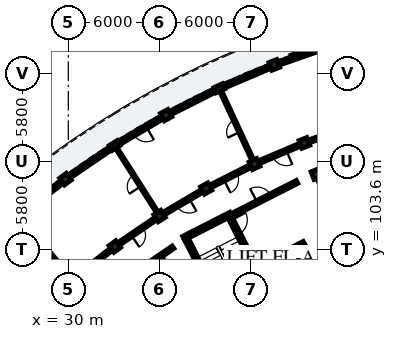
"""IFC4 building model, lengths in metres.
Left out: names, types, materials, properties, quantities, classifications, styles, units other than length and angle.
Written with IfcOpenShell. Run it as: python <this file> out.ifc"""

import sys

from ifc_helpers import new_model, si_unit, direction, frame, frame_2d, origin, origin_2d, place, context, subcontext, project, spatial, rectangle, extrude, element, fill, save


model = new_model("IFC4")
c1 = context("Model", 3, precision=1e-05, world=origin(), true_north=direction((0.0, 1.0)))
c2 = subcontext(c1, "Body", "Model", "MODEL_VIEW")
j1 = project(units=[si_unit("LENGTHUNIT", "METRE"), si_unit("PLANEANGLEUNIT", "RADIAN")], contexts=[c1])
p1 = place(None, origin())
s1 = spatial("IfcSite", under=j1, at=p1, CompositionType="ELEMENT")
p2 = place(p1, origin())
s2 = spatial("IfcBuilding", under=s1, at=p2, CompositionType="ELEMENT")
p3 = place(p2, frame((0.0, 0.0, 15.56)))
s3 = spatial("IfcBuildingStorey", under=s2, at=p3, CompositionType="ELEMENT", Elevation=15.56)
p4 = place(p3, frame((37.773, 104.296, 0.0), z_axis=(0.0, 0.0, 1.0), x_axis=(0.453992276384, -0.891005618941, 0.0)))
e1 = element("IfcWall", 1, at=p4, inside=s3, PredefinedType="SHEAR", context=c2, shape_type="SweptSolid", body=[
    extrude(rectangle(XDim=6.6, YDim=0.28, at=frame_2d((3.3, 0.0))), origin(), (0.0, 0.0, 1.0), 3.11),
])
p5 = place(p3, frame((37.585, 104.357, 0.0), z_axis=(0.0, 0.0, 1.0), x_axis=(0.891020222667, 0.453963613958, 0.0)))
e2 = element("IfcWall", 2, at=p5, inside=s3, PredefinedType="SHEAR", context=c2, shape_type="SweptSolid", body=[
    extrude(rectangle(XDim=3.48, YDim=0.28, at=frame_2d((1.74, 0.0))), origin(), (0.0, 0.0, 1.0), 3.11),
])
p6 = place(p3, frame((40.625, 105.748, 0.0), z_axis=(0.0, 0.0, 1.0), x_axis=(0.453992276384, -0.891005618941, 0.0)))
e3 = element("IfcWall", 3, at=p6, inside=s3, PredefinedType="SHEAR", context=c2, shape_type="SweptSolid", body=[
    extrude(rectangle(XDim=6.6, YDim=0.28, at=frame_2d((3.3, 0.0))), origin(), (0.0, 0.0, 1.0), 3.11),
])
p7 = place(p6, frame((0.22, 0.0, 0.0)))
e4 = element("IfcOpeningElement", 4, at=p7, cuts=e3, PredefinedType="OPENING", context=c2, shape_type="SweptSolid", body=[
    extrude(rectangle(XDim=1.05, YDim=2.15, at=frame_2d((0.525, 1.075))), frame((0.0, 0.15, 0.0), z_axis=(0.0, -1.0, 0.0), x_axis=(1.0, 0.0, 0.0)), (0.0, 0.0, 1.0), 0.3),
])
p8 = place(p3, frame((42.597, 102.561, 0.0), z_axis=(0.0, 0.0, 1.0), x_axis=(0.891001200497, 0.454000947921, 0.0)))
e5 = element("IfcWall", 5, at=p8, inside=s3, PredefinedType="SHEAR", context=c2, shape_type="SweptSolid", body=[
    extrude(rectangle(XDim=3.26, YDim=0.23, at=frame_2d((1.63, 0.0))), origin(), (0.0, 0.0, 1.0), 3.11),
])
p9 = place(p8, frame((0.9, 0.0, 0.0)))
e6 = element("IfcOpeningElement", 6, at=p9, cuts=e5, PredefinedType="OPENING", context=c2, shape_type="SweptSolid", body=[
    extrude(rectangle(XDim=1.1, YDim=2.15, at=frame_2d((0.55, 1.075))), frame((0.0, 0.125, 0.0), z_axis=(0.0, -1.0, 0.0), x_axis=(1.0, 0.0, 0.0)), (0.0, 0.0, 1.0), 0.25),
])
p10 = place(p3, frame((45.451, 103.886, 0.0), z_axis=(0.0, 0.0, 1.0), x_axis=(0.454000278178, -0.891001541758, 0.0)))
e7 = element("IfcWall", 7, at=p10, inside=s3, PredefinedType="SHEAR", context=c2, shape_type="SweptSolid", body=[
    extrude(rectangle(XDim=2.7, YDim=0.23, at=frame_2d((1.35, 0.0))), origin(), (0.0, 0.0, 1.0), 3.11),
])
for number, where, z_axis, x_axis in (
    (8, (46.325, 108.57, 0.0), (0.0, 0.0, 1.0), (-0.36, 0.933, 0.0)),
    (9, (45.532, 110.622, 0.0), (0.0, 0.0, 1.0), (-0.36, 0.933, 0.0)),
    (10, (43.552, 115.753, 0.0), (0.0, 0.0, 1.0), (-0.36, 0.933, 0.0)),
    (11, (42.252, 109.23, 0.0), (0.0, 0.0, 1.0), (-0.421, 0.907, 0.0)),
):
    element("IfcColumn", number, at=place(p3, frame(where, z_axis=z_axis, x_axis=x_axis)), inside=s3, PredefinedType="COLUMN", context=c2, shape_type="SweptSolid", body=[
        extrude(rectangle(XDim=0.55, YDim=0.55, at=origin_2d()), origin(), (0.0, 0.0, 1.0), 3.11),
    ])
p11 = place(p3, frame((39.938, 114.219, 0.0), z_axis=(0.0, 0.0, 1.0), x_axis=(-0.420859924104, 0.907125638643, 0.0)))
e12 = element("IfcColumn", 12, at=p11, inside=s3, PredefinedType="PILASTER", context=c2, shape_type="SweptSolid", body=[
    extrude(rectangle(XDim=0.38, YDim=0.62, at=origin_2d()), origin(), (0.0, 0.0, 1.0), 3.11),
])
for number, where, z_axis, x_axis in (
    (13, (39.072, 107.625, 0.0), (0.0, 0.0, 1.0), (-0.48, 0.877, 0.0)),
    (14, (36.433, 112.451, 0.0), (0.0, 0.0, 1.0), (-0.48, 0.877, 0.0)),
    (15, (36.003, 105.813, 0.0), (0.0, 0.0, 1.0), (-0.536, 0.844, 0.0)),
):
    element("IfcColumn", number, at=place(p3, frame(where, z_axis=z_axis, x_axis=x_axis)), inside=s3, PredefinedType="COLUMN", context=c2, shape_type="SweptSolid", body=[
        extrude(rectangle(XDim=0.55, YDim=0.55, at=origin_2d()), origin(), (0.0, 0.0, 1.0), 3.11),
    ])
p12 = place(p3, frame((33.052, 110.455, 0.0), z_axis=(0.0, 0.0, 1.0), x_axis=(-0.536481603385, 0.843912015099, 0.0)))
e16 = element("IfcColumn", 16, at=p12, inside=s3, PredefinedType="PILASTER", context=c2, shape_type="SweptSolid", body=[
    extrude(rectangle(XDim=0.38, YDim=0.62, at=origin_2d()), origin(), (0.0, 0.0, 1.0), 3.11),
])
for number, where, z_axis, x_axis in (
    (17, (33.061, 103.804, 0.0), (0.0, 0.0, 1.0), (-0.591, 0.807, 0.0)),
    (18, (29.811, 108.241, 0.0), (0.0, 0.0, 1.0), (-0.591, 0.807, 0.0)),
):
    element("IfcColumn", number, at=place(p3, frame(where, z_axis=z_axis, x_axis=x_axis)), inside=s3, PredefinedType="COLUMN", context=c2, shape_type="SweptSolid", body=[
        extrude(rectangle(XDim=0.55, YDim=0.55, at=origin_2d()), origin(), (0.0, 0.0, 1.0), 3.11),
    ])
p13 = place(p3, frame((47.107, 116.993, 0.0), z_axis=(0.0, 0.0, 1.0), x_axis=(-0.944267366677, -0.329179495455, 0.0)))
e19 = element("IfcWall", 19, at=p13, inside=s3, PredefinedType="SOLIDWALL", context=c2, shape_type="SweptSolid", body=[
    extrude(rectangle(XDim=3.521, YDim=0.245, at=frame_2d((1.76, 0.0))), origin(), (0.0, 0.0, 1.0), 2.355),
])
p14 = place(p13, frame((0.86, 0.0, 0.35)))
e20 = element("IfcOpeningElement", 20, at=p14, cuts=e19, PredefinedType="OPENING", context=c2, shape_type="SweptSolid", body=[
    extrude(rectangle(XDim=1.8, YDim=1.85, at=frame_2d((0.9, 0.925))), frame((0.0, 0.133, 0.0), z_axis=(0.0, -1.0, 0.0), x_axis=(1.0, 0.0, 0.0)), (0.0, 0.0, 1.0), 0.265),
])
p15 = place(p3, frame((43.326, 115.657, 0.0), z_axis=(0.0, 0.0, 1.0), x_axis=(-0.920502438884, -0.390736816807, 0.0)))
e21 = element("IfcWall", 21, at=p15, inside=s3, PredefinedType="SOLIDWALL", context=c2, shape_type="SweptSolid", body=[
    extrude(rectangle(XDim=3.521, YDim=0.245, at=frame_2d((1.76, 0.0))), origin(), (0.0, 0.0, 1.0), 2.355),
])
p16 = place(p15, frame((1.12, 0.0, 0.55)))
e22 = element("IfcOpeningElement", 22, at=p16, cuts=e21, PredefinedType="OPENING", context=c2, shape_type="SweptSolid", body=[
    extrude(rectangle(XDim=1.28, YDim=1.52, at=frame_2d((0.64, 0.76))), frame((0.0, 0.133, 0.0), z_axis=(0.0, -1.0, 0.0), x_axis=(1.0, 0.0, 0.0)), (0.0, 0.0, 1.0), 0.265),
])
p17 = place(p3, frame((39.795, 114.147, 0.0), z_axis=(0.0, 0.0, 1.0), x_axis=(-0.892756700232, -0.450539092855, 0.0)))
e23 = element("IfcWall", 23, at=p17, inside=s3, PredefinedType="SOLIDWALL", context=c2, shape_type="SweptSolid", body=[
    extrude(rectangle(XDim=3.521, YDim=0.245, at=frame_2d((1.76, 0.0))), origin(), (0.0, 0.0, 1.0), 2.355),
])
p18 = place(p17, frame((0.97, 0.0, 0.35)))
e24 = element("IfcOpeningElement", 24, at=p18, cuts=e23, PredefinedType="OPENING", context=c2, shape_type="SweptSolid", body=[
    extrude(rectangle(XDim=1.58, YDim=1.68, at=frame_2d((0.79, 0.84))), frame((0.0, 0.133, 0.0), z_axis=(0.0, -1.0, 0.0), x_axis=(1.0, 0.0, 0.0)), (0.0, 0.0, 1.0), 0.265),
])
p19 = place(p3, frame((36.222, 112.326, 0.0), z_axis=(0.0, 0.0, 1.0), x_axis=(-0.861154218161, -0.50834379365, 0.0)))
e25 = element("IfcWall", 25, at=p19, inside=s3, PredefinedType="SOLIDWALL", context=c2, shape_type="SweptSolid", body=[
    extrude(rectangle(XDim=3.521, YDim=0.245, at=frame_2d((1.76, 0.0))), origin(), (0.0, 0.0, 1.0), 2.355),
])
p20 = place(p19, frame((1.27, 0.0, 0.0)))
e26 = element("IfcOpeningElement", 26, at=p20, cuts=e25, PredefinedType="OPENING", context=c2, shape_type="SweptSolid", body=[
    extrude(rectangle(XDim=0.98, YDim=2.12, at=frame_2d((0.49, 1.06))), frame((0.0, 0.133, 0.0), z_axis=(0.0, -1.0, 0.0), x_axis=(1.0, 0.0, 0.0)), (0.0, 0.0, 1.0), 0.265),
])
p21 = place(p3, frame((32.92, 110.365, 0.0), z_axis=(0.0, 0.0, 1.0), x_axis=(-0.825745840472, -0.56404238045, 0.0)))
e27 = element("IfcWall", 27, at=p21, inside=s3, PredefinedType="SOLIDWALL", context=c2, shape_type="SweptSolid", body=[
    extrude(rectangle(XDim=3.521, YDim=0.245, at=frame_2d((1.76, 0.0))), origin(), (0.0, 0.0, 1.0), 2.355),
])
p22 = place(p21, frame((1.08, 0.0, 0.55)))
e28 = element("IfcOpeningElement", 28, at=p22, cuts=e27, PredefinedType="OPENING", context=c2, shape_type="SweptSolid", body=[
    extrude(rectangle(XDim=1.36, YDim=1.61, at=frame_2d((0.68, 0.805))), frame((0.0, 0.133, 0.0), z_axis=(0.0, -1.0, 0.0), x_axis=(1.0, 0.0, 0.0)), (0.0, 0.0, 1.0), 0.265),
])
p23 = place(p3, frame((29.618, 108.09, 0.0), z_axis=(0.0, 0.0, 1.0), x_axis=(-0.786813798172, -0.617190446301, 0.0)))
e29 = element("IfcWall", 29, at=p23, inside=s3, PredefinedType="SOLIDWALL", context=c2, shape_type="SweptSolid", body=[
    extrude(rectangle(XDim=3.521, YDim=0.245, at=frame_2d((1.76, 0.0))), origin(), (0.0, 0.0, 1.0), 2.355),
])
p24 = place(p23, frame((1.02, 0.0, 0.55)))
e30 = element("IfcOpeningElement", 30, at=p24, cuts=e29, PredefinedType="OPENING", context=c2, shape_type="SweptSolid", body=[
    extrude(rectangle(XDim=1.48, YDim=1.46, at=frame_2d((0.74, 0.73))), frame((0.0, 0.133, 0.0), z_axis=(0.0, -1.0, 0.0), x_axis=(1.0, 0.0, 0.0)), (0.0, 0.0, 1.0), 0.265),
])
p25 = place(p3, frame((40.682, 105.834, 0.0), z_axis=(0.0, 0.0, 1.0), x_axis=(0.891003372311, 0.453996685595, 0.0)))
e31 = element("IfcWall", 31, at=p25, inside=s3, PredefinedType="PARTITIONING", context=c2, shape_type="SweptSolid", body=[
    extrude(rectangle(XDim=4.9, YDim=0.22, at=frame_2d((2.45, 0.0))), origin(), (0.0, 0.0, 1.0), 2.34),
])
p26 = place(p25, frame((1.95, 0.0, 0.0)))
e32 = element("IfcOpeningElement", 32, at=p26, cuts=e31, PredefinedType="OPENING", context=c2, shape_type="SweptSolid", body=[
    extrude(rectangle(XDim=1.0, YDim=2.15, at=frame_2d((0.5, 1.075))), frame((0.0, 0.12, 0.0), z_axis=(0.0, -1.0, 0.0), x_axis=(1.0, 0.0, 0.0)), (0.0, 0.0, 1.0), 0.24),
])
p27 = place(p3, frame((48.566, 111.68, 0.0), z_axis=(0.0, 0.0, 1.0), x_axis=(-0.944253820929, -0.329218349522, 0.0)))
e33 = element("IfcWall", 33, at=p27, inside=s3, PredefinedType="PARTITIONING", context=c2, shape_type="SweptSolid", body=[
    extrude(rectangle(XDim=2.863, YDim=0.205, at=frame_2d((1.432, 0.0))), origin(), (0.0, 0.0, 1.0), 2.37),
])
p28 = place(p27, frame((0.967, 0.0, 0.0)))
e34 = element("IfcOpeningElement", 34, at=p28, cuts=e33, PredefinedType="OPENING", context=c2, shape_type="SweptSolid", body=[
    extrude(rectangle(XDim=0.93, YDim=2.12, at=frame_2d((0.465, 1.06))), frame((0.0, 0.113, 0.0), z_axis=(0.0, -1.0, 0.0), x_axis=(1.0, 0.0, 0.0)), (0.0, 0.0, 1.0), 0.225),
])
p29 = place(p3, frame((45.21, 110.486, 0.0), z_axis=(0.0, 0.0, 1.0), x_axis=(-0.920511160294, -0.390716270168, 0.0)))
e35 = element("IfcWall", 35, at=p29, inside=s3, PredefinedType="PARTITIONING", context=c2, shape_type="SweptSolid", body=[
    extrude(rectangle(XDim=2.863, YDim=0.205, at=frame_2d((1.432, 0.0))), origin(), (0.0, 0.0, 1.0), 2.37),
])
p30 = place(p29, frame((0.937, 0.0, 0.0)))
e36 = element("IfcOpeningElement", 36, at=p30, cuts=e35, PredefinedType="OPENING", context=c2, shape_type="SweptSolid", body=[
    extrude(rectangle(XDim=0.99, YDim=2.16, at=frame_2d((0.495, 1.08))), frame((0.0, 0.113, 0.0), z_axis=(0.0, -1.0, 0.0), x_axis=(1.0, 0.0, 0.0)), (0.0, 0.0, 1.0), 0.225),
])
p31 = place(p3, frame((42.084, 109.593, 0.0), z_axis=(0.0, 0.0, 1.0), x_axis=(-0.420862519045, 0.907124434718, 0.0)))
e37 = element("IfcWall", 37, at=p31, inside=s3, PredefinedType="PLUMBINGWALL", context=c2, shape_type="SweptSolid", body=[
    extrude(rectangle(XDim=4.7, YDim=0.14, at=frame_2d((2.35, 0.0))), origin(), (0.0, 0.0, 1.0), 2.37),
])
p32 = place(p31, frame((1.92, 0.0, 0.0)))
e38 = element("IfcOpeningElement", 38, at=p32, cuts=e37, PredefinedType="OPENING", context=c2, shape_type="SweptSolid", body=[
    extrude(rectangle(XDim=0.86, YDim=2.06, at=frame_2d((0.43, 1.03))), frame((0.0, 0.08, 0.0), z_axis=(0.0, -1.0, 0.0), x_axis=(1.0, 0.0, 0.0)), (0.0, 0.0, 1.0), 0.16),
])
p33 = place(p3, frame((41.94, 109.073, 0.0), z_axis=(0.0, 0.0, 1.0), x_axis=(-0.89273239336, -0.450587254419, 0.0)))
e39 = element("IfcWall", 39, at=p33, inside=s3, PredefinedType="PARTITIONING", context=c2, shape_type="SweptSolid", body=[
    extrude(rectangle(XDim=2.863, YDim=0.205, at=frame_2d((1.432, 0.0))), origin(), (0.0, 0.0, 1.0), 2.37),
])
p34 = place(p33, frame((0.947, 0.0, 0.0)))
e40 = element("IfcOpeningElement", 40, at=p34, cuts=e39, PredefinedType="OPENING", context=c2, shape_type="SweptSolid", body=[
    extrude(rectangle(XDim=0.97, YDim=2.15, at=frame_2d((0.485, 1.075))), frame((0.0, 0.113, 0.0), z_axis=(0.0, -1.0, 0.0), x_axis=(1.0, 0.0, 0.0)), (0.0, 0.0, 1.0), 0.225),
])
p35 = place(p3, frame((38.77, 107.447, 0.0), z_axis=(0.0, 0.0, 1.0), x_axis=(-0.861113214678, -0.508413248753, 0.0)))
e41 = element("IfcWall", 41, at=p35, inside=s3, PredefinedType="PARTITIONING", context=c2, shape_type="SweptSolid", body=[
    extrude(rectangle(XDim=2.863, YDim=0.205, at=frame_2d((1.432, 0.0))), origin(), (0.0, 0.0, 1.0), 2.37),
])
p36 = place(p35, frame((0.957, 0.0, 0.0)))
e42 = element("IfcOpeningElement", 42, at=p36, cuts=e41, PredefinedType="OPENING", context=c2, shape_type="SweptSolid", body=[
    extrude(rectangle(XDim=0.95, YDim=2.13, at=frame_2d((0.475, 1.065))), frame((0.0, 0.113, 0.0), z_axis=(0.0, -1.0, 0.0), x_axis=(1.0, 0.0, 0.0)), (0.0, 0.0, 1.0), 0.225),
])
p37 = place(p3, frame((35.789, 106.151, 0.0), z_axis=(0.0, 0.0, 1.0), x_axis=(-0.536492262982, 0.843905238614, 0.0)))
e43 = element("IfcWall", 43, at=p37, inside=s3, PredefinedType="PARTITIONING", context=c2, shape_type="SweptSolid", body=[
    extrude(rectangle(XDim=4.7, YDim=0.125, at=frame_2d((2.35, 0.0))), origin(), (0.0, 0.0, 1.0), 2.37),
])
p38 = place(p37, frame((1.905, 0.0, 0.0)))
e44 = element("IfcOpeningElement", 44, at=p38, cuts=e43, PredefinedType="OPENING", context=c2, shape_type="SweptSolid", body=[
    extrude(rectangle(XDim=0.89, YDim=2.1, at=frame_2d((0.445, 1.05))), frame((0.0, 0.073, 0.0), z_axis=(0.0, -1.0, 0.0), x_axis=(1.0, 0.0, 0.0)), (0.0, 0.0, 1.0), 0.145),
])
p39 = place(p3, frame((35.714, 105.616, 0.0), z_axis=(0.0, 0.0, 1.0), x_axis=(-0.825779671787, -0.563992848947, 0.0)))
e45 = element("IfcWall", 45, at=p39, inside=s3, PredefinedType="PARTITIONING", context=c2, shape_type="SweptSolid", body=[
    extrude(rectangle(XDim=2.863, YDim=0.205, at=frame_2d((1.432, 0.0))), origin(), (0.0, 0.0, 1.0), 2.37),
])
p40 = place(p39, frame((0.967, 0.0, 0.0)))
e46 = element("IfcOpeningElement", 46, at=p40, cuts=e45, PredefinedType="OPENING", context=c2, shape_type="SweptSolid", body=[
    extrude(rectangle(XDim=0.93, YDim=2.12, at=frame_2d((0.465, 1.06))), frame((0.0, 0.113, 0.0), z_axis=(0.0, -1.0, 0.0), x_axis=(1.0, 0.0, 0.0)), (0.0, 0.0, 1.0), 0.225),
])
p41 = place(p3, frame((36.895, 103.76, 0.0), z_axis=(0.0, 0.0, 1.0), x_axis=(-0.825752009056, -0.56403334967, 0.0)))
e47 = element("IfcWall", 47, at=p41, inside=s3, PredefinedType="PARTITIONING", context=c2, shape_type="SweptSolid", body=[
    extrude(rectangle(XDim=2.718, YDim=0.205, at=frame_2d((1.359, 0.0))), origin(), (0.0, 0.0, 1.0), 2.37),
])
p42 = place(p41, frame((0.894, 0.0, 0.0)))
e48 = element("IfcOpeningElement", 48, at=p42, cuts=e47, PredefinedType="OPENING", context=c2, shape_type="SweptSolid", body=[
    extrude(rectangle(XDim=0.93, YDim=2.12, at=frame_2d((0.465, 1.06))), frame((0.0, 0.113, 0.0), z_axis=(0.0, -1.0, 0.0), x_axis=(1.0, 0.0, 0.0)), (0.0, 0.0, 1.0), 0.225),
])
p43 = place(p3, frame((32.785, 103.588, 0.0), z_axis=(0.0, 0.0, 1.0), x_axis=(-0.786806323554, -0.617199975061, 0.0)))
e49 = element("IfcWall", 49, at=p43, inside=s3, PredefinedType="PARTITIONING", context=c2, shape_type="SweptSolid", body=[
    extrude(rectangle(XDim=2.863, YDim=0.205, at=frame_2d((1.432, 0.0))), origin(), (0.0, 0.0, 1.0), 2.37),
])
p44 = place(p43, frame((0.937, 0.0, 0.0)))
e50 = element("IfcOpeningElement", 50, at=p44, cuts=e49, PredefinedType="OPENING", context=c2, shape_type="SweptSolid", body=[
    extrude(rectangle(XDim=0.99, YDim=2.16, at=frame_2d((0.495, 1.08))), frame((0.0, 0.113, 0.0), z_axis=(0.0, -1.0, 0.0), x_axis=(1.0, 0.0, 0.0)), (0.0, 0.0, 1.0), 0.225),
])
p45 = place(p3, frame((30.0, 101.911, 0.0), z_axis=(0.0, 0.0, 1.0), x_axis=(-0.642811926223, 0.766024038465, 0.0)))
e51 = element("IfcWall", 51, at=p45, inside=s3, PredefinedType="PLUMBINGWALL", context=c2, shape_type="SweptSolid", body=[
    extrude(rectangle(XDim=4.7, YDim=0.14, at=frame_2d((2.35, 0.0))), origin(), (0.0, 0.0, 1.0), 2.37),
])
p46 = place(p45, frame((1.92, 0.0, 0.0)))
e52 = element("IfcOpeningElement", 52, at=p46, cuts=e51, PredefinedType="OPENING", context=c2, shape_type="SweptSolid", body=[
    extrude(rectangle(XDim=0.86, YDim=2.06, at=frame_2d((0.43, 1.03))), frame((0.0, 0.08, 0.0), z_axis=(0.0, -1.0, 0.0), x_axis=(1.0, 0.0, 0.0)), (0.0, 0.0, 1.0), 0.16),
])
p47 = place(p14, origin())
e53 = element("IfcWindow", 53, at=p47, inside=s3, PartitioningType="SINGLE_PANEL", PredefinedType="WINDOW", context=c2, shape_type="SweptSolid", body=[
    extrude(rectangle(XDim=1.8, YDim=1.85, at=frame_2d((0.9, 0.925))), frame((0.0, 0.03, 0.0), z_axis=(0.0, -1.0, 0.0), x_axis=(1.0, 0.0, 0.0)), (0.0, 0.0, 1.0), 0.06),
])
fill(e20, e53)
p48 = place(p16, origin())
e54 = element("IfcWindow", 54, at=p48, inside=s3, PartitioningType="SINGLE_PANEL", PredefinedType="WINDOW", context=c2, shape_type="SweptSolid", body=[
    extrude(rectangle(XDim=1.28, YDim=1.52, at=frame_2d((0.64, 0.76))), frame((0.0, 0.03, 0.0), z_axis=(0.0, -1.0, 0.0), x_axis=(1.0, 0.0, 0.0)), (0.0, 0.0, 1.0), 0.06),
])
fill(e22, e54)
p49 = place(p18, origin())
e55 = element("IfcWindow", 55, at=p49, inside=s3, PartitioningType="SINGLE_PANEL", PredefinedType="WINDOW", context=c2, shape_type="SweptSolid", body=[
    extrude(rectangle(XDim=1.58, YDim=1.68, at=frame_2d((0.79, 0.84))), frame((0.0, 0.03, 0.0), z_axis=(0.0, -1.0, 0.0), x_axis=(1.0, 0.0, 0.0)), (0.0, 0.0, 1.0), 0.06),
])
fill(e24, e55)
p50 = place(p20, origin())
e56 = element("IfcDoor", 56, at=p50, inside=s3, OperationType="SINGLE_SWING_LEFT", PredefinedType="DOOR", context=c2, shape_type="SweptSolid", body=[
    extrude(rectangle(XDim=0.98, YDim=2.12, at=frame_2d((0.49, 1.06))), frame((0.0, 0.025, 0.0), z_axis=(0.0, -1.0, 0.0), x_axis=(1.0, 0.0, 0.0)), (0.0, 0.0, 1.0), 0.05),
])
fill(e26, e56)
p51 = place(p22, origin())
e57 = element("IfcWindow", 57, at=p51, inside=s3, PartitioningType="SINGLE_PANEL", PredefinedType="WINDOW", context=c2, shape_type="SweptSolid", body=[
    extrude(rectangle(XDim=1.36, YDim=1.61, at=frame_2d((0.68, 0.805))), frame((0.0, 0.03, 0.0), z_axis=(0.0, -1.0, 0.0), x_axis=(1.0, 0.0, 0.0)), (0.0, 0.0, 1.0), 0.06),
])
fill(e28, e57)
p52 = place(p7, origin())
e58 = element("IfcDoor", 58, at=p52, inside=s3, OperationType="SINGLE_SWING_LEFT", PredefinedType="DOOR", context=c2, shape_type="SweptSolid", body=[
    extrude(rectangle(XDim=1.05, YDim=2.15, at=frame_2d((0.525, 1.075))), frame((0.0, 0.025, 0.0), z_axis=(0.0, -1.0, 0.0), x_axis=(1.0, 0.0, 0.0)), (0.0, 0.0, 1.0), 0.05),
])
fill(e4, e58)
p53 = place(p9, origin())
e59 = element("IfcDoor", 59, at=p53, inside=s3, OperationType="DOUBLE_DOOR_SLIDING", PredefinedType="DOOR", context=c2, shape_type="SweptSolid", body=[
    extrude(rectangle(XDim=1.1, YDim=2.15, at=frame_2d((0.55, 1.075))), frame((0.0, 0.025, 0.0), z_axis=(0.0, -1.0, 0.0), x_axis=(1.0, 0.0, 0.0)), (0.0, 0.0, 1.0), 0.05),
])
fill(e6, e59)
p54 = place(p26, origin())
e60 = element("IfcDoor", 60, at=p54, inside=s3, OperationType="SINGLE_SWING_LEFT", PredefinedType="DOOR", context=c2, shape_type="SweptSolid", body=[
    extrude(rectangle(XDim=1.0, YDim=2.15, at=frame_2d((0.5, 1.075))), frame((0.0, 0.025, 0.0), z_axis=(0.0, -1.0, 0.0), x_axis=(1.0, 0.0, 0.0)), (0.0, 0.0, 1.0), 0.05),
])
fill(e32, e60)
p55 = place(p30, origin())
e61 = element("IfcDoor", 61, at=p55, inside=s3, OperationType="SINGLE_SWING_LEFT", PredefinedType="DOOR", context=c2, shape_type="SweptSolid", body=[
    extrude(rectangle(XDim=0.99, YDim=2.16, at=frame_2d((0.495, 1.08))), frame((0.0, 0.025, 0.0), z_axis=(0.0, -1.0, 0.0), x_axis=(1.0, 0.0, 0.0)), (0.0, 0.0, 1.0), 0.05),
])
fill(e36, e61)
p56 = place(p32, origin())
e62 = element("IfcDoor", 62, at=p56, inside=s3, OperationType="SINGLE_SWING_LEFT", PredefinedType="DOOR", context=c2, shape_type="SweptSolid", body=[
    extrude(rectangle(XDim=0.86, YDim=2.06, at=frame_2d((0.43, 1.03))), frame((0.0, 0.025, 0.0), z_axis=(0.0, -1.0, 0.0), x_axis=(1.0, 0.0, 0.0)), (0.0, 0.0, 1.0), 0.05),
])
fill(e38, e62)
p57 = place(p34, origin())
e63 = element("IfcDoor", 63, at=p57, inside=s3, OperationType="SINGLE_SWING_RIGHT", PredefinedType="DOOR", context=c2, shape_type="SweptSolid", body=[
    extrude(rectangle(XDim=0.97, YDim=2.15, at=frame_2d((0.485, 1.075))), frame((0.0, 0.025, 0.0), z_axis=(0.0, -1.0, 0.0), x_axis=(1.0, 0.0, 0.0)), (0.0, 0.0, 1.0), 0.05),
])
fill(e40, e63)
p58 = place(p36, origin())
e64 = element("IfcDoor", 64, at=p58, inside=s3, OperationType="SINGLE_SWING_LEFT", PredefinedType="DOOR", context=c2, shape_type="SweptSolid", body=[
    extrude(rectangle(XDim=0.95, YDim=2.13, at=frame_2d((0.475, 1.065))), frame((0.0, 0.025, 0.0), z_axis=(0.0, -1.0, 0.0), x_axis=(1.0, 0.0, 0.0)), (0.0, 0.0, 1.0), 0.05),
])
fill(e42, e64)
p59 = place(p38, origin())
e65 = element("IfcDoor", 65, at=p59, inside=s3, OperationType="SINGLE_SWING_LEFT", PredefinedType="DOOR", context=c2, shape_type="SweptSolid", body=[
    extrude(rectangle(XDim=0.89, YDim=2.1, at=frame_2d((0.445, 1.05))), frame((0.0, 0.025, 0.0), z_axis=(0.0, -1.0, 0.0), x_axis=(1.0, 0.0, 0.0)), (0.0, 0.0, 1.0), 0.05),
])
fill(e44, e65)
p60 = place(p40, origin())
e66 = element("IfcDoor", 66, at=p60, inside=s3, OperationType="SINGLE_SWING_RIGHT", PredefinedType="DOOR", context=c2, shape_type="SweptSolid", body=[
    extrude(rectangle(XDim=0.93, YDim=2.12, at=frame_2d((0.465, 1.06))), frame((0.0, 0.025, 0.0), z_axis=(0.0, -1.0, 0.0), x_axis=(1.0, 0.0, 0.0)), (0.0, 0.0, 1.0), 0.05),
])
fill(e46, e66)
p61 = place(p42, origin())
e67 = element("IfcDoor", 67, at=p61, inside=s3, OperationType="SINGLE_SWING_LEFT", PredefinedType="DOOR", context=c2, shape_type="SweptSolid", body=[
    extrude(rectangle(XDim=0.93, YDim=2.12, at=frame_2d((0.465, 1.06))), frame((0.0, 0.025, 0.0), z_axis=(0.0, -1.0, 0.0), x_axis=(1.0, 0.0, 0.0)), (0.0, 0.0, 1.0), 0.05),
])
fill(e48, e67)
p62 = place(p44, origin())
e68 = element("IfcDoor", 68, at=p62, inside=s3, OperationType="SINGLE_SWING_LEFT", PredefinedType="DOOR", context=c2, shape_type="SweptSolid", body=[
    extrude(rectangle(XDim=0.99, YDim=2.16, at=frame_2d((0.495, 1.08))), frame((0.0, 0.025, 0.0), z_axis=(0.0, -1.0, 0.0), x_axis=(1.0, 0.0, 0.0)), (0.0, 0.0, 1.0), 0.05),
])
fill(e50, e68)
save(model, sys.argv[1])
